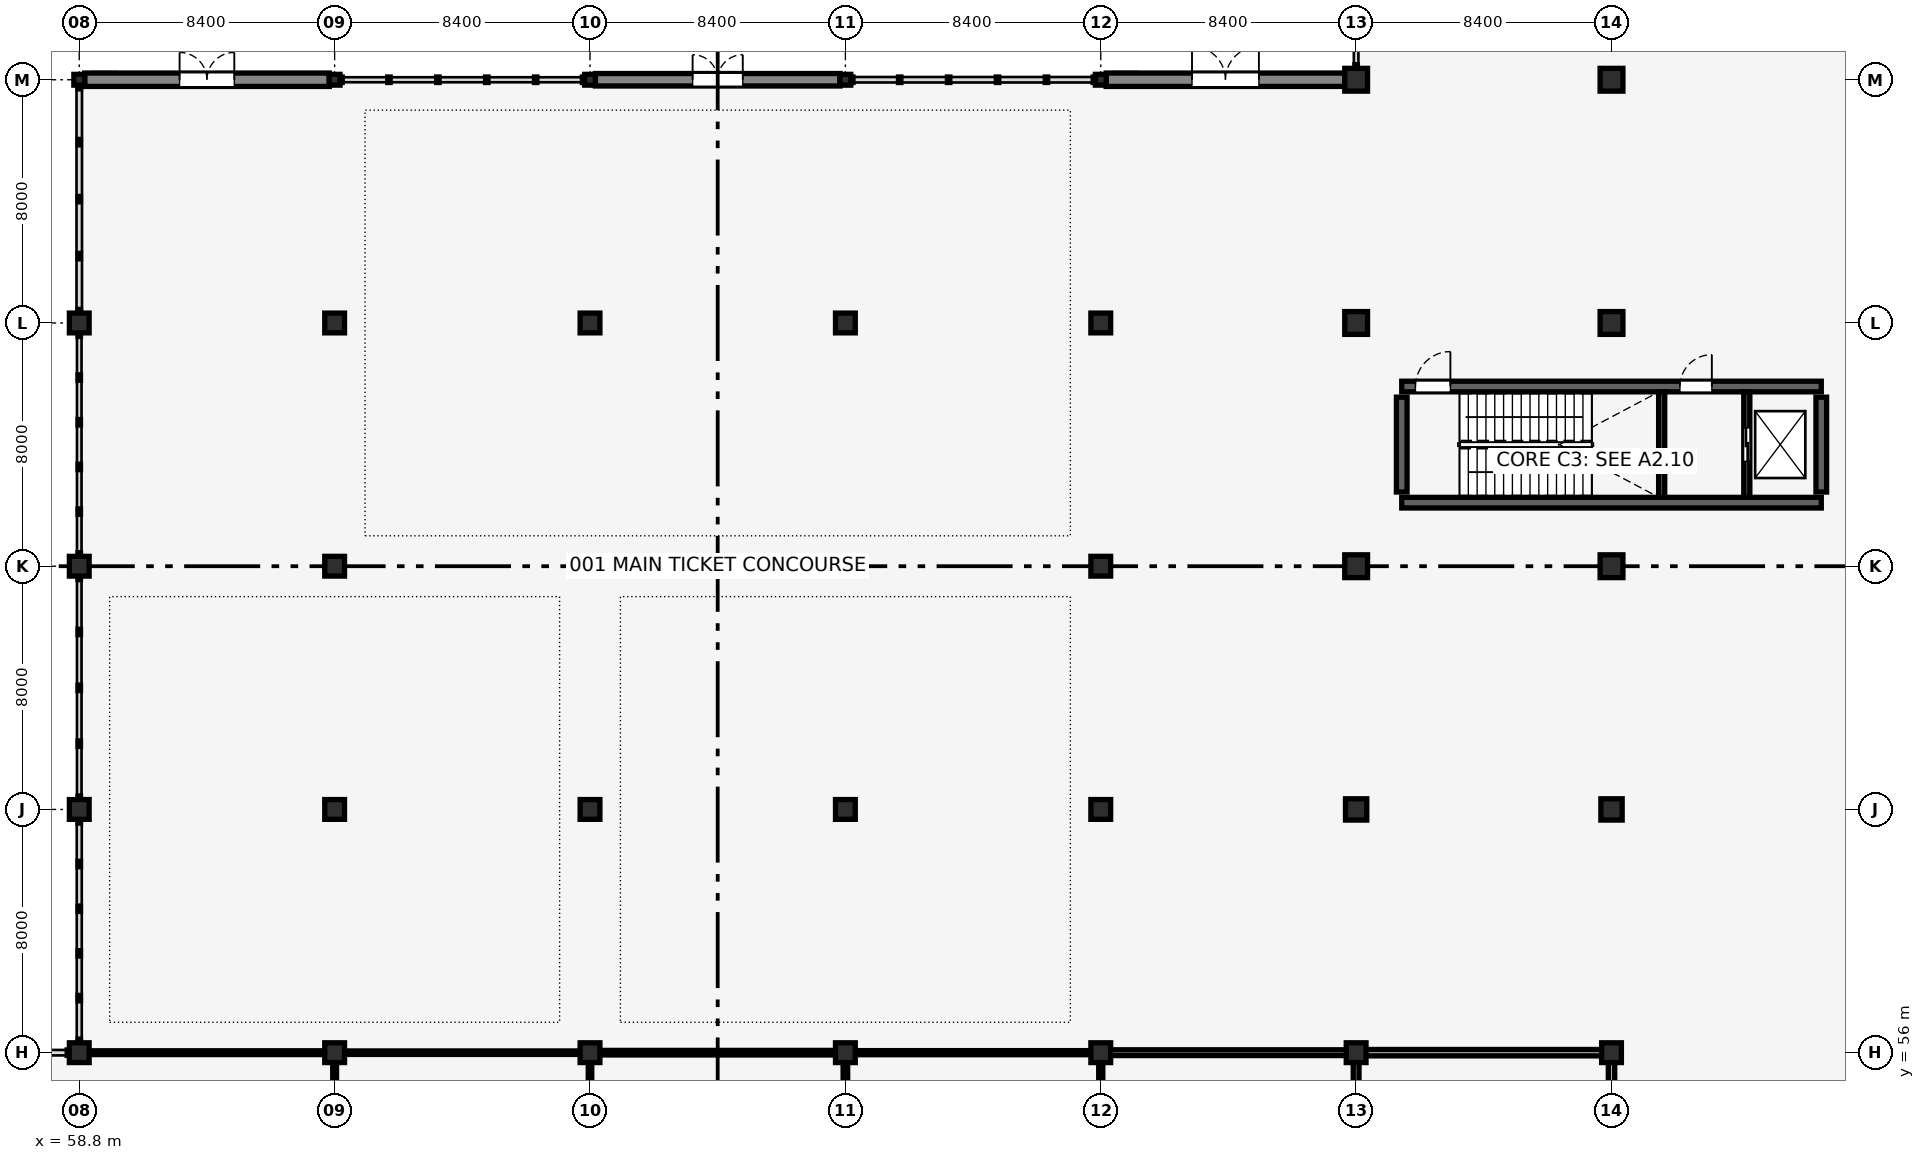
"""IFC4 building model, lengths in metres.
Left out: names, types, materials, properties, quantities, classifications, styles, units other than length and angle.
Written with IfcOpenShell. Run it as: python <this file> out.ifc"""

import sys

from ifc_helpers import new_model, si_unit, direction, frame, frame_2d, origin, origin_2d, place, context, subcontext, project, spatial, rectangle, circle, hollow_circle, extrude, element, fill, save


model = new_model("IFC4")
c1 = context("Model", 3, precision=1e-05, world=origin(), true_north=direction((0.0, 1.0)))
c2 = subcontext(c1, "Body", "Model", "MODEL_VIEW")
j1 = project(units=[si_unit("LENGTHUNIT", "METRE"), si_unit("PLANEANGLEUNIT", "RADIAN")], contexts=[c1])
p1 = place(None, origin())
s1 = spatial("IfcSite", under=j1, at=p1, CompositionType="ELEMENT")
p2 = place(p1, origin())
s2 = spatial("IfcBuilding", under=s1, at=p2, CompositionType="ELEMENT")
p3 = place(p2, origin())
s3 = spatial("IfcBuildingStorey", under=s2, at=p3, CompositionType="ELEMENT", Elevation=0.0)
p4 = place(p3, frame((102.3, 74.09, 0.0), z_axis=(0.0, 0.0, 1.0), x_axis=(1.0, 0.0, 0.0)))
e1 = element("IfcWall", 1, at=p4, inside=s3, PredefinedType="SHEAR", context=c2, shape_type="SweptSolid", body=[
    extrude(rectangle(XDim=13.8, YDim=0.35, at=frame_2d((6.9, 0.0))), origin(), (0.0, 0.0, 1.0), 5.15),
])
p5 = place(p3, frame((102.3, 77.91, 0.0), z_axis=(0.0, 0.0, 1.0), x_axis=(1.0, 0.0, 0.0)))
e2 = element("IfcWall", 2, at=p5, inside=s3, PredefinedType="SHEAR", context=c2, shape_type="SweptSolid", body=[
    extrude(rectangle(XDim=13.8, YDim=0.35, at=frame_2d((6.9, 0.0))), origin(), (0.0, 0.0, 1.0), 5.15),
])
p6 = place(p5, frame((0.45, 0.0, 0.0), z_axis=(0.0, 0.0, 1.0), x_axis=(1.0, 0.0, 0.0)))
e3 = element("IfcOpeningElement", 3, at=p6, cuts=e2, PredefinedType="OPENING", context=c2, shape_type="SweptSolid", body=[
    extrude(rectangle(XDim=1.15, YDim=2.15, at=frame_2d((0.575, 1.075))), frame((0.0, 0.185, 0.0), z_axis=(0.0, -1.0, 0.0), x_axis=(1.0, 0.0, 0.0)), (0.0, 0.0, 1.0), 0.37),
])
p7 = place(p5, frame((9.15, 0.0, 0.0), z_axis=(0.0, 0.0, 1.0), x_axis=(1.0, 0.0, 0.0)))
e4 = element("IfcOpeningElement", 4, at=p7, cuts=e2, PredefinedType="OPENING", context=c2, shape_type="SweptSolid", body=[
    extrude(rectangle(XDim=1.05, YDim=2.15, at=frame_2d((0.525, 1.075))), frame((0.0, 0.185, 0.0), z_axis=(0.0, -1.0, 0.0), x_axis=(1.0, 0.0, 0.0)), (0.0, 0.0, 1.0), 0.37),
])
for number, where, z_axis, x_axis in (
    (5, (102.3, 74.44, 0.0), (0.0, 0.0, 1.0), (0.0, 1.0, 0.0)),
    (6, (116.1, 74.44, 0.0), (0.0, 0.0, 1.0), (0.0, 1.0, 0.0)),
):
    element("IfcWall", number, at=place(p3, frame(where, z_axis=z_axis, x_axis=x_axis)), inside=s3, PredefinedType="SHEAR", context=c2, shape_type="SweptSolid", body=[
        extrude(rectangle(XDim=3.12, YDim=0.35, at=frame_2d((1.56, 0.0))), origin(), (0.0, 0.0, 1.0), 5.15),
    ])
for number, where, z_axis, x_axis in (
    (7, (58.8, 56.0, 0.0), (0.0, 0.0, 1.0), (1.0, 0.0, 0.0)),
    (8, (58.8, 64.0, 0.0), (0.0, 0.0, 1.0), (1.0, 0.0, 0.0)),
    (9, (58.8, 72.0, 0.0), (0.0, 0.0, 1.0), (1.0, 0.0, 0.0)),
    (10, (58.8, 80.0, 0.0), (0.0, 0.0, 1.0), (1.0, 0.0, 0.0)),
):
    element("IfcColumn", number, at=place(p3, frame(where, z_axis=z_axis, x_axis=x_axis)), inside=s3, PredefinedType="COLUMN", context=c2, shape_type="SweptSolid", body=[
        extrude(circle(Radius=0.325, at=origin_2d()), origin(), (0.0, 0.0, 1.0), 5.15),
    ])
p8 = place(p3, frame((58.8, 88.0, 0.0), z_axis=(0.0, 0.0, 1.0), x_axis=(1.0, 0.0, 0.0)))
e11 = element("IfcColumn", 11, at=p8, inside=s3, PredefinedType="COLUMN", context=c2, shape_type="SweptSolid", body=[
    extrude(hollow_circle(Radius=0.178, WallThickness=0.012, at=origin_2d()), origin(), (0.0, 0.0, 1.0), 5.15),
])
for number, where, z_axis, x_axis in (
    (12, (67.2, 56.0, 0.0), (0.0, 0.0, 1.0), (1.0, 0.0, 0.0)),
    (13, (67.2, 64.0, 0.0), (0.0, 0.0, 1.0), (1.0, 0.0, 0.0)),
    (14, (67.2, 72.0, 0.0), (0.0, 0.0, 1.0), (1.0, 0.0, 0.0)),
    (15, (67.2, 80.0, 0.0), (0.0, 0.0, 1.0), (1.0, 0.0, 0.0)),
):
    element("IfcColumn", number, at=place(p3, frame(where, z_axis=z_axis, x_axis=x_axis)), inside=s3, PredefinedType="COLUMN", context=c2, shape_type="SweptSolid", body=[
        extrude(circle(Radius=0.325, at=origin_2d()), origin(), (0.0, 0.0, 1.0), 5.15),
    ])
p9 = place(p3, frame((67.2, 88.0, 0.0), z_axis=(0.0, 0.0, 1.0), x_axis=(1.0, 0.0, 0.0)))
e16 = element("IfcColumn", 16, at=p9, inside=s3, PredefinedType="COLUMN", context=c2, shape_type="SweptSolid", body=[
    extrude(hollow_circle(Radius=0.178, WallThickness=0.012, at=origin_2d()), origin(), (0.0, 0.0, 1.0), 5.15),
])
for number, where, z_axis, x_axis in (
    (17, (75.6, 56.0, 0.0), (0.0, 0.0, 1.0), (1.0, 0.0, 0.0)),
    (18, (75.6, 64.0, 0.0), (0.0, 0.0, 1.0), (1.0, 0.0, 0.0)),
    (19, (75.6, 80.0, 0.0), (0.0, 0.0, 1.0), (1.0, 0.0, 0.0)),
):
    element("IfcColumn", number, at=place(p3, frame(where, z_axis=z_axis, x_axis=x_axis)), inside=s3, PredefinedType="COLUMN", context=c2, shape_type="SweptSolid", body=[
        extrude(circle(Radius=0.325, at=origin_2d()), origin(), (0.0, 0.0, 1.0), 5.15),
    ])
p10 = place(p3, frame((75.6, 88.0, 0.0), z_axis=(0.0, 0.0, 1.0), x_axis=(1.0, 0.0, 0.0)))
e20 = element("IfcColumn", 20, at=p10, inside=s3, PredefinedType="COLUMN", context=c2, shape_type="SweptSolid", body=[
    extrude(hollow_circle(Radius=0.178, WallThickness=0.012, at=origin_2d()), origin(), (0.0, 0.0, 1.0), 5.15),
])
for number, where, z_axis, x_axis in (
    (21, (84.0, 56.0, 0.0), (0.0, 0.0, 1.0), (1.0, 0.0, 0.0)),
    (22, (84.0, 64.0, 0.0), (0.0, 0.0, 1.0), (1.0, 0.0, 0.0)),
    (23, (84.0, 80.0, 0.0), (0.0, 0.0, 1.0), (1.0, 0.0, 0.0)),
):
    element("IfcColumn", number, at=place(p3, frame(where, z_axis=z_axis, x_axis=x_axis)), inside=s3, PredefinedType="COLUMN", context=c2, shape_type="SweptSolid", body=[
        extrude(circle(Radius=0.325, at=origin_2d()), origin(), (0.0, 0.0, 1.0), 5.15),
    ])
p11 = place(p3, frame((84.0, 88.0, 0.0), z_axis=(0.0, 0.0, 1.0), x_axis=(1.0, 0.0, 0.0)))
e24 = element("IfcColumn", 24, at=p11, inside=s3, PredefinedType="COLUMN", context=c2, shape_type="SweptSolid", body=[
    extrude(hollow_circle(Radius=0.178, WallThickness=0.012, at=origin_2d()), origin(), (0.0, 0.0, 1.0), 5.15),
])
for number, where, z_axis, x_axis in (
    (25, (92.4, 56.0, 0.0), (0.0, 0.0, 1.0), (1.0, 0.0, 0.0)),
    (26, (92.4, 64.0, 0.0), (0.0, 0.0, 1.0), (1.0, 0.0, 0.0)),
    (27, (92.4, 72.0, 0.0), (0.0, 0.0, 1.0), (1.0, 0.0, 0.0)),
    (28, (92.4, 80.0, 0.0), (0.0, 0.0, 1.0), (1.0, 0.0, 0.0)),
):
    element("IfcColumn", number, at=place(p3, frame(where, z_axis=z_axis, x_axis=x_axis)), inside=s3, PredefinedType="COLUMN", context=c2, shape_type="SweptSolid", body=[
        extrude(circle(Radius=0.325, at=origin_2d()), origin(), (0.0, 0.0, 1.0), 5.15),
    ])
p12 = place(p3, frame((92.4, 88.0, 0.0), z_axis=(0.0, 0.0, 1.0), x_axis=(1.0, 0.0, 0.0)))
e29 = element("IfcColumn", 29, at=p12, inside=s3, PredefinedType="COLUMN", context=c2, shape_type="SweptSolid", body=[
    extrude(hollow_circle(Radius=0.178, WallThickness=0.012, at=origin_2d()), origin(), (0.0, 0.0, 1.0), 5.15),
])
p13 = place(p3, frame((100.8, 56.0, 0.0), z_axis=(0.0, 0.0, 1.0), x_axis=(1.0, 0.0, 0.0)))
e30 = element("IfcColumn", 30, at=p13, inside=s3, PredefinedType="COLUMN", context=c2, shape_type="SweptSolid", body=[
    extrude(circle(Radius=0.325, at=origin_2d()), origin(), (0.0, 0.0, 1.0), 5.15),
])
p14 = place(p3, frame((100.8, 64.0, 0.0), z_axis=(0.0, 0.0, 1.0), x_axis=(1.0, 0.0, 0.0)))
e31 = element("IfcColumn", 31, at=p14, inside=s3, PredefinedType="COLUMN", context=c2, shape_type="SweptSolid", body=[
    extrude(rectangle(XDim=0.7, YDim=0.7, at=origin_2d()), origin(), (0.0, 0.0, 1.0), 5.15),
])
for number, where, z_axis, x_axis in (
    (32, (100.8, 72.0, 0.0), (0.0, 0.0, 1.0), (1.0, 0.0, 0.0)),
    (33, (100.8, 80.0, 0.0), (0.0, 0.0, 1.0), (1.0, 0.0, 0.0)),
    (34, (100.8, 88.0, 0.0), (0.0, 0.0, 1.0), (1.0, 0.0, 0.0)),
):
    element("IfcColumn", number, at=place(p3, frame(where, z_axis=z_axis, x_axis=x_axis)), inside=s3, PredefinedType="COLUMN", context=c2, shape_type="SweptSolid", body=[
        extrude(rectangle(XDim=0.75, YDim=0.75, at=origin_2d()), origin(), (0.0, 0.0, 1.0), 5.15),
    ])
p15 = place(p3, frame((109.2, 56.0, 0.0), z_axis=(0.0, 0.0, 1.0), x_axis=(1.0, 0.0, 0.0)))
e35 = element("IfcColumn", 35, at=p15, inside=s3, PredefinedType="COLUMN", context=c2, shape_type="SweptSolid", body=[
    extrude(circle(Radius=0.325, at=origin_2d()), origin(), (0.0, 0.0, 1.0), 5.15),
])
p16 = place(p3, frame((109.2, 64.0, 0.0), z_axis=(0.0, 0.0, 1.0), x_axis=(1.0, 0.0, 0.0)))
e36 = element("IfcColumn", 36, at=p16, inside=s3, PredefinedType="COLUMN", context=c2, shape_type="SweptSolid", body=[
    extrude(rectangle(XDim=0.7, YDim=0.7, at=origin_2d()), origin(), (0.0, 0.0, 1.0), 5.15),
])
for number, where, z_axis, x_axis in (
    (37, (109.2, 72.0, 0.0), (0.0, 0.0, 1.0), (1.0, 0.0, 0.0)),
    (38, (109.2, 80.0, 0.0), (0.0, 0.0, 1.0), (1.0, 0.0, 0.0)),
    (39, (109.2, 88.0, 0.0), (0.0, 0.0, 1.0), (1.0, 0.0, 0.0)),
):
    element("IfcColumn", number, at=place(p3, frame(where, z_axis=z_axis, x_axis=x_axis)), inside=s3, PredefinedType="COLUMN", context=c2, shape_type="SweptSolid", body=[
        extrude(rectangle(XDim=0.75, YDim=0.75, at=origin_2d()), origin(), (0.0, 0.0, 1.0), 5.15),
    ])
p17 = place(p3, frame((58.978, 88.0, 0.0), z_axis=(0.0, 0.0, 1.0), x_axis=(1.0, 0.0, 0.0)))
e40 = element("IfcWall", 40, at=p17, inside=s3, PredefinedType="SOLIDWALL", context=c2, shape_type="SweptSolid", body=[
    extrude(rectangle(XDim=8.044, YDim=0.44, at=frame_2d((4.022, 0.0))), origin(), (0.0, 0.0, 1.0), 4.74),
])
p18 = place(p17, frame((3.122, 0.0, 0.0), z_axis=(0.0, 0.0, 1.0), x_axis=(1.0, 0.0, 0.0)))
e41 = element("IfcOpeningElement", 41, at=p18, cuts=e40, PredefinedType="OPENING", context=c2, shape_type="SweptSolid", body=[
    extrude(rectangle(XDim=1.8, YDim=2.2, at=frame_2d((0.9, 1.1))), frame((0.0, 0.23, 0.0), z_axis=(0.0, -1.0, 0.0), x_axis=(1.0, 0.0, 0.0)), (0.0, 0.0, 1.0), 0.46),
])
p19 = place(p3, frame((75.778, 88.0, 0.0), z_axis=(0.0, 0.0, 1.0), x_axis=(1.0, 0.0, 0.0)))
e42 = element("IfcWall", 42, at=p19, inside=s3, PredefinedType="SOLIDWALL", context=c2, shape_type="SweptSolid", body=[
    extrude(rectangle(XDim=8.044, YDim=0.41, at=frame_2d((4.022, 0.0))), origin(), (0.0, 0.0, 1.0), 4.74),
])
p20 = place(p19, frame((3.197, 0.0, 0.0), z_axis=(0.0, 0.0, 1.0), x_axis=(1.0, 0.0, 0.0)))
e43 = element("IfcOpeningElement", 43, at=p20, cuts=e42, PredefinedType="OPENING", context=c2, shape_type="SweptSolid", body=[
    extrude(rectangle(XDim=1.65, YDim=2.3, at=frame_2d((0.825, 1.15))), frame((0.0, 0.215, 0.0), z_axis=(0.0, -1.0, 0.0), x_axis=(1.0, 0.0, 0.0)), (0.0, 0.0, 1.0), 0.43),
])
p21 = place(p3, frame((92.578, 88.0, 0.0), z_axis=(0.0, 0.0, 1.0), x_axis=(1.0, 0.0, 0.0)))
e44 = element("IfcWall", 44, at=p21, inside=s3, PredefinedType="SOLIDWALL", context=c2, shape_type="SweptSolid", body=[
    extrude(rectangle(XDim=7.847, YDim=0.44, at=frame_2d((3.924, 0.0))), origin(), (0.0, 0.0, 1.0), 4.74),
])
p22 = place(p21, frame((2.823, 0.0, 0.0), z_axis=(0.0, 0.0, 1.0), x_axis=(1.0, 0.0, 0.0)))
e45 = element("IfcOpeningElement", 45, at=p22, cuts=e44, PredefinedType="OPENING", context=c2, shape_type="SweptSolid", body=[
    extrude(rectangle(XDim=2.2, YDim=2.4, at=frame_2d((1.1, 1.2))), frame((0.0, 0.23, 0.0), z_axis=(0.0, -1.0, 0.0), x_axis=(1.0, 0.0, 0.0)), (0.0, 0.0, 1.0), 0.46),
])
p23 = place(p3, frame((110.85, 74.265, 0.0), z_axis=(0.0, 0.0, 1.0), x_axis=(0.0, 1.0, 0.0)))
e46 = element("IfcWall", 46, at=p23, inside=s3, PredefinedType="SHEAR", context=c2, shape_type="SweptSolid", body=[
    extrude(rectangle(XDim=3.47, YDim=0.2, at=frame_2d((1.735, 0.0))), origin(), (0.0, 0.0, 1.0), 5.15),
])
p24 = place(p3, frame((113.65, 74.265, 0.0), z_axis=(0.0, 0.0, 1.0), x_axis=(0.0, 1.0, 0.0)))
e47 = element("IfcWall", 47, at=p24, inside=s3, PredefinedType="SHEAR", context=c2, shape_type="SweptSolid", body=[
    extrude(rectangle(XDim=3.47, YDim=0.2, at=frame_2d((1.735, 0.0))), origin(), (0.0, 0.0, 1.0), 5.15),
])
p25 = place(p24, frame((1.185, 0.0, 0.0), z_axis=(0.0, 0.0, 1.0), x_axis=(1.0, 0.0, 0.0)))
e48 = element("IfcOpeningElement", 48, at=p25, cuts=e47, PredefinedType="OPENING", context=c2, shape_type="SweptSolid", body=[
    extrude(rectangle(XDim=1.1, YDim=2.15, at=frame_2d((0.55, 1.075))), frame((0.0, 0.11, 0.0), z_axis=(0.0, -1.0, 0.0), x_axis=(1.0, 0.0, 0.0)), (0.0, 0.0, 1.0), 0.22),
])
p26 = place(p3, frame((59.115, 56.0, 0.0), z_axis=(0.0, 0.0, 1.0), x_axis=(1.0, 0.0, 0.0)))
e49 = element("IfcWall", 49, at=p26, inside=s3, PredefinedType="PARTITIONING", context=c2, shape_type="SweptSolid", body=[
    extrude(rectangle(XDim=7.77, YDim=0.125, at=frame_2d((3.885, 0.0))), origin(), (0.0, 0.0, 1.0), 4.605),
])
p27 = place(p3, frame((67.2, 48.315, 0.0), z_axis=(0.0, 0.0, 1.0), x_axis=(0.0, 1.0, 0.0)))
e50 = element("IfcWall", 50, at=p27, inside=s3, PredefinedType="PARTITIONING", context=c2, shape_type="SweptSolid", body=[
    extrude(rectangle(XDim=7.37, YDim=0.125, at=frame_2d((3.685, 0.0))), origin(), (0.0, 0.0, 1.0), 4.542),
])
p28 = place(p3, frame((67.515, 56.0, 0.0), z_axis=(0.0, 0.0, 1.0), x_axis=(1.0, 0.0, 0.0)))
e51 = element("IfcWall", 51, at=p28, inside=s3, PredefinedType="PARTITIONING", context=c2, shape_type="SweptSolid", body=[
    extrude(rectangle(XDim=7.77, YDim=0.115, at=frame_2d((3.885, 0.0))), origin(), (0.0, 0.0, 1.0), 4.605),
])
p29 = place(p3, frame((75.6, 48.315, 0.0), z_axis=(0.0, 0.0, 1.0), x_axis=(0.0, 1.0, 0.0)))
e52 = element("IfcWall", 52, at=p29, inside=s3, PredefinedType="PARTITIONING", context=c2, shape_type="SweptSolid", body=[
    extrude(rectangle(XDim=7.37, YDim=0.115, at=frame_2d((3.685, 0.0))), origin(), (0.0, 0.0, 1.0), 4.542),
])
p30 = place(p3, frame((75.915, 56.0, 0.0), z_axis=(0.0, 0.0, 1.0), x_axis=(1.0, 0.0, 0.0)))
e53 = element("IfcWall", 53, at=p30, inside=s3, PredefinedType="PARTITIONING", context=c2, shape_type="SweptSolid", body=[
    extrude(rectangle(XDim=7.77, YDim=0.15, at=frame_2d((3.885, 0.0))), origin(), (0.0, 0.0, 1.0), 4.605),
])
p31 = place(p3, frame((84.0, 48.315, 0.0), z_axis=(0.0, 0.0, 1.0), x_axis=(0.0, 1.0, 0.0)))
e54 = element("IfcWall", 54, at=p31, inside=s3, PredefinedType="PARTITIONING", context=c2, shape_type="SweptSolid", body=[
    extrude(rectangle(XDim=7.37, YDim=0.15, at=frame_2d((3.685, 0.0))), origin(), (0.0, 0.0, 1.0), 4.542),
])
p32 = place(p3, frame((84.315, 56.0, 0.0), z_axis=(0.0, 0.0, 1.0), x_axis=(1.0, 0.0, 0.0)))
e55 = element("IfcWall", 55, at=p32, inside=s3, PredefinedType="PARTITIONING", context=c2, shape_type="SweptSolid", body=[
    extrude(rectangle(XDim=7.77, YDim=0.135, at=frame_2d((3.885, 0.0))), origin(), (0.0, 0.0, 1.0), 4.605),
])
p33 = place(p3, frame((92.4, 48.315, 0.0), z_axis=(0.0, 0.0, 1.0), x_axis=(0.0, 1.0, 0.0)))
e56 = element("IfcWall", 56, at=p33, inside=s3, PredefinedType="PARTITIONING", context=c2, shape_type="SweptSolid", body=[
    extrude(rectangle(XDim=7.37, YDim=0.135, at=frame_2d((3.685, 0.0))), origin(), (0.0, 0.0, 1.0), 4.542),
])
p34 = place(p3, frame((92.715, 56.0, 0.0), z_axis=(0.0, 0.0, 1.0), x_axis=(1.0, 0.0, 0.0)))
e57 = element("IfcWall", 57, at=p34, inside=s3, PredefinedType="PLUMBINGWALL", context=c2, shape_type="SweptSolid", body=[
    extrude(rectangle(XDim=7.77, YDim=0.19, at=frame_2d((3.885, 0.0))), origin(), (0.0, 0.0, 1.0), 4.605),
])
p35 = place(p3, frame((100.8, 48.315, 0.0), z_axis=(0.0, 0.0, 1.0), x_axis=(0.0, 1.0, 0.0)))
e58 = element("IfcWall", 58, at=p35, inside=s3, PredefinedType="PLUMBINGWALL", context=c2, shape_type="SweptSolid", body=[
    extrude(rectangle(XDim=7.37, YDim=0.19, at=frame_2d((3.685, 0.0))), origin(), (0.0, 0.0, 1.0), 4.542),
])
p36 = place(p3, frame((101.115, 56.0, 0.0), z_axis=(0.0, 0.0, 1.0), x_axis=(1.0, 0.0, 0.0)))
e59 = element("IfcWall", 59, at=p36, inside=s3, PredefinedType="PLUMBINGWALL", context=c2, shape_type="SweptSolid", body=[
    extrude(rectangle(XDim=7.77, YDim=0.21, at=frame_2d((3.885, 0.0))), origin(), (0.0, 0.0, 1.0), 4.605),
])
p37 = place(p3, frame((109.2, 48.315, 0.0), z_axis=(0.0, 0.0, 1.0), x_axis=(0.0, 1.0, 0.0)))
e60 = element("IfcWall", 60, at=p37, inside=s3, PredefinedType="PLUMBINGWALL", context=c2, shape_type="SweptSolid", body=[
    extrude(rectangle(XDim=7.37, YDim=0.21, at=frame_2d((3.685, 0.0))), origin(), (0.0, 0.0, 1.0), 4.542),
])
p38 = place(p18, origin())
e61 = element("IfcDoor", 61, at=p38, inside=s3, OperationType="DOUBLE_DOOR_SINGLE_SWING", PredefinedType="DOOR", context=c2, shape_type="SweptSolid", body=[
    extrude(rectangle(XDim=1.8, YDim=2.2, at=frame_2d((0.9, 1.1))), frame((0.0, 0.025, 0.0), z_axis=(0.0, -1.0, 0.0), x_axis=(1.0, 0.0, 0.0)), (0.0, 0.0, 1.0), 0.05),
])
fill(e41, e61)
p39 = place(p20, origin())
e62 = element("IfcDoor", 62, at=p39, inside=s3, OperationType="DOUBLE_DOOR_SINGLE_SWING", PredefinedType="DOOR", context=c2, shape_type="SweptSolid", body=[
    extrude(rectangle(XDim=1.65, YDim=2.3, at=frame_2d((0.825, 1.15))), frame((0.0, 0.025, 0.0), z_axis=(0.0, -1.0, 0.0), x_axis=(1.0, 0.0, 0.0)), (0.0, 0.0, 1.0), 0.05),
])
fill(e43, e62)
p40 = place(p22, origin())
e63 = element("IfcDoor", 63, at=p40, inside=s3, OperationType="DOUBLE_DOOR_SINGLE_SWING", PredefinedType="DOOR", context=c2, shape_type="SweptSolid", body=[
    extrude(rectangle(XDim=2.2, YDim=2.4, at=frame_2d((1.1, 1.2))), frame((0.0, 0.025, 0.0), z_axis=(0.0, -1.0, 0.0), x_axis=(1.0, 0.0, 0.0)), (0.0, 0.0, 1.0), 0.05),
])
fill(e45, e63)
p41 = place(p6, origin())
e64 = element("IfcDoor", 64, at=p41, inside=s3, OperationType="SINGLE_SWING_RIGHT", PredefinedType="DOOR", context=c2, shape_type="SweptSolid", body=[
    extrude(rectangle(XDim=1.15, YDim=2.15, at=frame_2d((0.575, 1.075))), frame((0.0, 0.025, 0.0), z_axis=(0.0, -1.0, 0.0), x_axis=(1.0, 0.0, 0.0)), (0.0, 0.0, 1.0), 0.05),
])
fill(e3, e64)
p42 = place(p7, origin())
e65 = element("IfcDoor", 65, at=p42, inside=s3, OperationType="SINGLE_SWING_RIGHT", PredefinedType="DOOR", context=c2, shape_type="SweptSolid", body=[
    extrude(rectangle(XDim=1.05, YDim=2.15, at=frame_2d((0.525, 1.075))), frame((0.0, 0.025, 0.0), z_axis=(0.0, -1.0, 0.0), x_axis=(1.0, 0.0, 0.0)), (0.0, 0.0, 1.0), 0.05),
])
fill(e4, e65)
p43 = place(p25, origin())
e66 = element("IfcDoor", 66, at=p43, inside=s3, OperationType="DOUBLE_DOOR_SLIDING", PredefinedType="DOOR", context=c2, shape_type="SweptSolid", body=[
    extrude(rectangle(XDim=1.1, YDim=2.15, at=frame_2d((0.55, 1.075))), frame((0.0, 0.025, 0.0), z_axis=(0.0, -1.0, 0.0), x_axis=(1.0, 0.0, 0.0)), (0.0, 0.0, 1.0), 0.05),
])
fill(e48, e66)
save(model, sys.argv[1])
